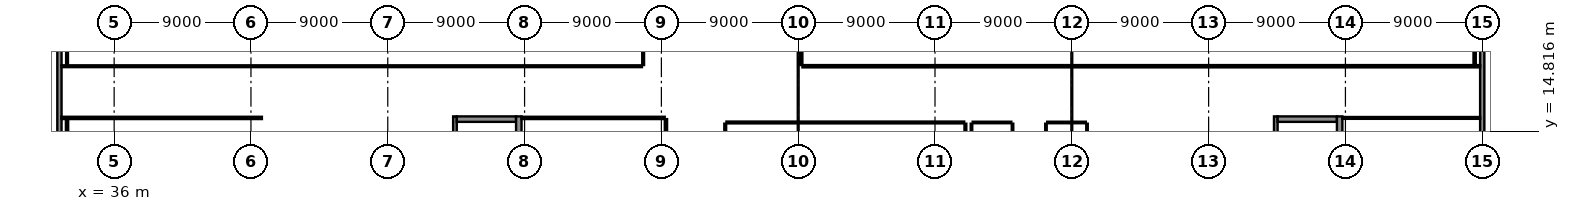
"""IFC4 building model, lengths in metres.
Left out: names, types, materials, properties, quantities, classifications, styles, units other than length and angle.
Written with IfcOpenShell. Run it as: python <this file> out.ifc"""

import sys

from ifc_helpers import new_model, si_unit, direction, frame, frame_2d, origin, place, context, subcontext, project, spatial, rectangle, extrude, element, fill, save


model = new_model("IFC4")
c1 = context("Model", 3, precision=1e-05, world=origin(), true_north=direction((0.0, 1.0)))
c2 = subcontext(c1, "Body", "Model", "MODEL_VIEW")
j1 = project(units=[si_unit("LENGTHUNIT", "METRE"), si_unit("PLANEANGLEUNIT", "RADIAN")], contexts=[c1])
p1 = place(None, origin())
s1 = spatial("IfcSite", under=j1, at=p1, CompositionType="ELEMENT")
p2 = place(p1, origin())
s2 = spatial("IfcBuilding", under=s1, at=p2, CompositionType="ELEMENT")
p3 = place(p2, frame((0.0, 0.0, 31.4)))
s3 = spatial("IfcBuildingStorey", under=s2, at=p3, CompositionType="ELEMENT", Elevation=31.4)
p4 = place(p3, frame((32.4, 23.96, 0.0), z_axis=(0.0, 0.0, 1.0), x_axis=(0.0, -1.0, 0.0)))
e1 = element("IfcWall", 1, at=p4, inside=s3, PredefinedType="SOLIDWALL", context=c2, shape_type="SweptSolid", body=[
    extrude(rectangle(XDim=11.97, YDim=0.28, at=frame_2d((5.985, 0.0))), origin(), (0.0, 0.0, 1.0), 3.095),
])
p5 = place(p4, frame((2.941, 0.0, 1.05)))
e2 = element("IfcOpeningElement", 2, at=p5, cuts=e1, PredefinedType="OPENING", context=c2, shape_type="SweptSolid", body=[
    extrude(rectangle(XDim=1.3, YDim=1.3, at=frame_2d((0.65, 0.65))), frame((0.0, 0.155, 0.0), z_axis=(0.0, -1.0, 0.0), x_axis=(1.0, 0.0, 0.0)), (0.0, 0.0, 1.0), 0.31),
])
p6 = place(p4, frame((8.5, 0.0, 1.05)))
e3 = element("IfcOpeningElement", 3, at=p6, cuts=e1, PredefinedType="OPENING", context=c2, shape_type="SweptSolid", body=[
    extrude(rectangle(XDim=1.3, YDim=1.3, at=frame_2d((0.65, 0.65))), frame((0.0, 0.155, 0.0), z_axis=(0.0, -1.0, 0.0), x_axis=(1.0, 0.0, 0.0)), (0.0, 0.0, 1.0), 0.31),
])
p7 = place(p3, frame((126.0, 12.128, 0.0), z_axis=(0.0, 0.0, 1.0), x_axis=(0.0, 1.0, 0.0)))
e4 = element("IfcWall", 4, at=p7, inside=s3, PredefinedType="SOLIDWALL", context=c2, shape_type="SweptSolid", body=[
    extrude(rectangle(XDim=11.624, YDim=0.28, at=frame_2d((5.812, 0.0))), origin(), (0.0, 0.0, 1.0), 3.245),
])
p8 = place(p7, frame((2.032, 0.0, 1.05)))
e5 = element("IfcOpeningElement", 5, at=p8, cuts=e4, PredefinedType="OPENING", context=c2, shape_type="SweptSolid", body=[
    extrude(rectangle(XDim=1.3, YDim=1.3, at=frame_2d((0.65, 0.65))), frame((0.0, 0.155, 0.0), z_axis=(0.0, -1.0, 0.0), x_axis=(1.0, 0.0, 0.0)), (0.0, 0.0, 1.0), 0.31),
])
p9 = place(p7, frame((7.487, 0.0, 1.05)))
e6 = element("IfcOpeningElement", 6, at=p9, cuts=e4, PredefinedType="OPENING", context=c2, shape_type="SweptSolid", body=[
    extrude(rectangle(XDim=1.3, YDim=1.3, at=frame_2d((0.65, 0.65))), frame((0.0, 0.155, 0.0), z_axis=(0.0, -1.0, 0.0), x_axis=(1.0, 0.0, 0.0)), (0.0, 0.0, 1.0), 0.31),
])
p10 = place(p3, frame((58.42, 13.04, 0.0), z_axis=(0.0, 0.0, 1.0), x_axis=(0.0, 1.0, 0.0)))
e7 = element("IfcWall", 7, at=p10, inside=s3, PredefinedType="SHEAR", context=c2, shape_type="SweptSolid", body=[
    extrude(rectangle(XDim=2.76, YDim=0.24, at=frame_2d((1.38, 0.0))), origin(), (0.0, 0.0, 1.0), 3.66),
])
p11 = place(p3, frame((58.54, 15.62, 0.0), z_axis=(0.0, 0.0, 1.0), x_axis=(1.0, 0.0, 0.0)))
e8 = element("IfcWall", 8, at=p11, inside=s3, PredefinedType="SHEAR", context=c2, shape_type="SweptSolid", body=[
    extrude(rectangle(XDim=3.9, YDim=0.36, at=frame_2d((1.95, 0.0))), origin(), (0.0, 0.0, 1.0), 3.66),
])
p12 = place(p11, frame((1.15, 0.0, 0.0)))
e9 = element("IfcOpeningElement", 9, at=p12, cuts=e8, PredefinedType="OPENING", context=c2, shape_type="SweptSolid", body=[
    extrude(rectangle(XDim=1.6, YDim=2.25, at=frame_2d((0.8, 1.125))), frame((0.0, 0.195, 0.0), z_axis=(0.0, -1.0, 0.0), x_axis=(1.0, 0.0, 0.0)), (0.0, 0.0, 1.0), 0.39),
])
p13 = place(p3, frame((62.62, 6.76, 0.0), z_axis=(0.0, 0.0, 1.0), x_axis=(0.0, 1.0, 0.0)))
e10 = element("IfcWall", 10, at=p13, inside=s3, PredefinedType="SHEAR", context=c2, shape_type="SweptSolid", body=[
    extrude(rectangle(XDim=9.04, YDim=0.36, at=frame_2d((4.52, 0.0))), origin(), (0.0, 0.0, 1.0), 3.66),
])
p14 = place(p3, frame((112.42, 13.04, 0.0), z_axis=(0.0, 0.0, 1.0), x_axis=(0.0, 1.0, 0.0)))
e11 = element("IfcWall", 11, at=p14, inside=s3, PredefinedType="SHEAR", context=c2, shape_type="SweptSolid", body=[
    extrude(rectangle(XDim=2.76, YDim=0.24, at=frame_2d((1.38, 0.0))), origin(), (0.0, 0.0, 1.0), 3.66),
])
p15 = place(p3, frame((112.54, 15.62, 0.0), z_axis=(0.0, 0.0, 1.0), x_axis=(1.0, 0.0, 0.0)))
e12 = element("IfcWall", 12, at=p15, inside=s3, PredefinedType="SHEAR", context=c2, shape_type="SweptSolid", body=[
    extrude(rectangle(XDim=3.9, YDim=0.36, at=frame_2d((1.95, 0.0))), origin(), (0.0, 0.0, 1.0), 3.66),
])
p16 = place(p15, frame((1.15, 0.0, 0.0)))
e13 = element("IfcOpeningElement", 13, at=p16, cuts=e12, PredefinedType="OPENING", context=c2, shape_type="SweptSolid", body=[
    extrude(rectangle(XDim=1.6, YDim=2.25, at=frame_2d((0.8, 1.125))), frame((0.0, 0.195, 0.0), z_axis=(0.0, -1.0, 0.0), x_axis=(1.0, 0.0, 0.0)), (0.0, 0.0, 1.0), 0.39),
])
p17 = place(p3, frame((116.62, 6.76, 0.0), z_axis=(0.0, 0.0, 1.0), x_axis=(0.0, 1.0, 0.0)))
e14 = element("IfcWall", 14, at=p17, inside=s3, PredefinedType="SHEAR", context=c2, shape_type="SweptSolid", body=[
    extrude(rectangle(XDim=9.04, YDim=0.36, at=frame_2d((4.52, 0.0))), origin(), (0.0, 0.0, 1.0), 3.66),
])
p18 = place(p3, frame((32.9, 0.47, 0.0), z_axis=(0.0, 0.0, 1.0), x_axis=(0.0, 1.0, 0.0)))
e15 = element("IfcWall", 15, at=p18, inside=s3, PredefinedType="PARTITIONING", context=c2, shape_type="SweptSolid", body=[
    extrude(rectangle(XDim=15.15, YDim=0.15, at=frame_2d((7.575, 0.0))), origin(), (0.0, 0.0, 1.0), 3.64),
])
p19 = place(p3, frame((32.535, 15.7, 0.0), z_axis=(0.0, 0.0, 1.0), x_axis=(1.0, 0.0, 0.0)))
e16 = element("IfcWall", 16, at=p19, inside=s3, PredefinedType="PARTITIONING", context=c2, shape_type="SweptSolid", body=[
    extrude(rectangle(XDim=13.185, YDim=0.15, at=frame_2d((6.593, 0.0))), origin(), (0.0, 0.0, 1.0), 3.64),
])
p20 = place(p19, frame((6.068, 0.0, 0.0)))
e17 = element("IfcOpeningElement", 17, at=p20, cuts=e16, PredefinedType="OPENING", context=c2, shape_type="SweptSolid", body=[
    extrude(rectangle(XDim=1.05, YDim=2.25, at=frame_2d((0.525, 1.125))), frame((0.0, 0.09, 0.0), z_axis=(0.0, -1.0, 0.0), x_axis=(1.0, 0.0, 0.0)), (0.0, 0.0, 1.0), 0.18),
])
p21 = place(p3, frame((62.795, 15.7, 0.0), z_axis=(0.0, 0.0, 1.0), x_axis=(1.0, 0.0, 0.0)))
e18 = element("IfcWall", 18, at=p21, inside=s3, PredefinedType="PARTITIONING", context=c2, shape_type="SweptSolid", body=[
    extrude(rectangle(XDim=9.425, YDim=0.15, at=frame_2d((4.712, 0.0))), origin(), (0.0, 0.0, 1.0), 3.64),
])
p22 = place(p21, frame((4.187, 0.0, 0.0)))
e19 = element("IfcOpeningElement", 19, at=p22, cuts=e18, PredefinedType="OPENING", context=c2, shape_type="SweptSolid", body=[
    extrude(rectangle(XDim=1.05, YDim=2.25, at=frame_2d((0.525, 1.125))), frame((0.0, 0.09, 0.0), z_axis=(0.0, -1.0, 0.0), x_axis=(1.0, 0.0, 0.0)), (0.0, 0.0, 1.0), 0.18),
])
p23 = place(p3, frame((72.3, 15.62, 0.0), z_axis=(0.0, 0.0, 1.0), x_axis=(0.0, -1.0, 0.0)))
e20 = element("IfcWall", 20, at=p23, inside=s3, PredefinedType="PARTITIONING", context=c2, shape_type="SweptSolid", body=[
    extrude(rectangle(XDim=3.04, YDim=0.15, at=frame_2d((1.52, 0.0))), origin(), (0.0, 0.0, 1.0), 3.64),
])
p24 = place(p3, frame((70.8, 23.865, 0.0), z_axis=(0.0, 0.0, 1.0), x_axis=(0.0, -1.0, 0.0)))
e21 = element("IfcWall", 21, at=p24, inside=s3, PredefinedType="PARTITIONING", context=c2, shape_type="SweptSolid", body=[
    extrude(rectangle(XDim=4.685, YDim=0.12, at=frame_2d((2.343, 0.0))), origin(), (0.0, 0.0, 1.0), 3.64),
])
p25 = place(p3, frame((70.72, 19.1, 0.0), z_axis=(0.0, 0.0, 1.0), x_axis=(-1.0, 0.0, 0.0)))
e22 = element("IfcWall", 22, at=p25, inside=s3, PredefinedType="PARTITIONING", context=c2, shape_type="SweptSolid", body=[
    extrude(rectangle(XDim=38.185, YDim=0.12, at=frame_2d((19.093, 0.0))), origin(), (0.0, 0.0, 1.0), 3.64),
])
p26 = place(p25, frame((18.617, 0.0, 0.0)))
e23 = element("IfcOpeningElement", 23, at=p26, cuts=e22, PredefinedType="OPENING", context=c2, shape_type="SweptSolid", body=[
    extrude(rectangle(XDim=0.95, YDim=2.15, at=frame_2d((0.475, 1.075))), frame((0.0, 0.075, 0.0), z_axis=(0.0, -1.0, 0.0), x_axis=(1.0, 0.0, 0.0)), (0.0, 0.0, 1.0), 0.15),
])
p27 = place(p3, frame((32.9, 19.155, 0.0), z_axis=(0.0, 0.0, 1.0), x_axis=(0.0, 1.0, 0.0)))
e24 = element("IfcWall", 24, at=p27, inside=s3, PredefinedType="PARTITIONING", context=c2, shape_type="SweptSolid", body=[
    extrude(rectangle(XDim=4.71, YDim=0.12, at=frame_2d((2.355, 0.0))), origin(), (0.0, 0.0, 1.0), 3.64),
])
p28 = place(p3, frame((125.865, 19.1, 0.0), z_axis=(0.0, 0.0, 1.0), x_axis=(-1.0, 0.0, 0.0)))
e25 = element("IfcWall", 25, at=p28, inside=s3, PredefinedType="PARTITIONING", context=c2, shape_type="SweptSolid", body=[
    extrude(rectangle(XDim=44.585, YDim=0.15, at=frame_2d((22.292, 0.0))), origin(), (0.0, 0.0, 1.0), 3.64),
])
p29 = place(p28, frame((21.768, 0.0, 0.0)))
e26 = element("IfcOpeningElement", 26, at=p29, cuts=e25, PredefinedType="OPENING", context=c2, shape_type="SweptSolid", body=[
    extrude(rectangle(XDim=1.05, YDim=2.25, at=frame_2d((0.525, 1.125))), frame((0.0, 0.09, 0.0), z_axis=(0.0, -1.0, 0.0), x_axis=(1.0, 0.0, 0.0)), (0.0, 0.0, 1.0), 0.18),
])
p30 = place(p3, frame((81.2, 19.18, 0.0), z_axis=(0.0, 0.0, 1.0), x_axis=(0.0, 1.0, 0.0)))
e27 = element("IfcWall", 27, at=p30, inside=s3, PredefinedType="PARTITIONING", context=c2, shape_type="SweptSolid", body=[
    extrude(rectangle(XDim=4.572, YDim=0.15, at=frame_2d((2.286, 0.0))), origin(), (0.0, 0.0, 1.0), 3.315),
])
p31 = place(p3, frame((125.5, 23.53, 0.0), z_axis=(0.0, 0.0, 1.0), x_axis=(0.0, -1.0, 0.0)))
e28 = element("IfcWall", 28, at=p31, inside=s3, PredefinedType="PARTITIONING", context=c2, shape_type="SweptSolid", body=[
    extrude(rectangle(XDim=4.36, YDim=0.15, at=frame_2d((2.18, 0.0))), origin(), (0.0, 0.0, 1.0), 3.64),
])
p32 = place(p3, frame((76.2, 3.67, 0.0), z_axis=(0.0, 0.0, 1.0), x_axis=(0.0, 1.0, 0.0)))
e29 = element("IfcWall", 29, at=p32, inside=s3, PredefinedType="PARTITIONING", context=c2, shape_type="SweptSolid", body=[
    extrude(rectangle(XDim=11.65, YDim=0.12, at=frame_2d((5.825, 0.0))), origin(), (0.0, 0.0, 1.0), 3.64),
])
p33 = place(p3, frame((76.28, 15.4, 0.0), z_axis=(0.0, 0.0, 1.0), x_axis=(1.0, 0.0, 0.0)))
e30 = element("IfcWall", 30, at=p33, inside=s3, PredefinedType="PARTITIONING", context=c2, shape_type="SweptSolid", body=[
    extrude(rectangle(XDim=15.64, YDim=0.12, at=frame_2d((7.82, 0.0))), origin(), (0.0, 0.0, 1.0), 3.64),
])
p34 = place(p33, frame((7.37, 0.0, 0.0)))
e31 = element("IfcOpeningElement", 31, at=p34, cuts=e30, PredefinedType="OPENING", context=c2, shape_type="SweptSolid", body=[
    extrude(rectangle(XDim=0.9, YDim=2.1, at=frame_2d((0.45, 1.05))), frame((0.0, 0.075, 0.0), z_axis=(0.0, -1.0, 0.0), x_axis=(1.0, 0.0, 0.0)), (0.0, 0.0, 1.0), 0.15),
])
p35 = place(p3, frame((92.0, 15.32, 0.0), z_axis=(0.0, 0.0, 1.0), x_axis=(0.0, -1.0, 0.0)))
e32 = element("IfcWall", 32, at=p35, inside=s3, PredefinedType="PARTITIONING", context=c2, shape_type="SweptSolid", body=[
    extrude(rectangle(XDim=11.65, YDim=0.12, at=frame_2d((5.825, 0.0))), origin(), (0.0, 0.0, 1.0), 3.64),
])
p36 = place(p3, frame((116.795, 15.7, 0.0), z_axis=(0.0, 0.0, 1.0), x_axis=(1.0, 0.0, 0.0)))
e33 = element("IfcWall", 33, at=p36, inside=s3, PredefinedType="PARTITIONING", context=c2, shape_type="SweptSolid", body=[
    extrude(rectangle(XDim=9.07, YDim=0.12, at=frame_2d((4.535, 0.0))), origin(), (0.0, 0.0, 1.0), 3.64),
])
p37 = place(p36, frame((4.06, 0.0, 0.0)))
e34 = element("IfcOpeningElement", 34, at=p37, cuts=e33, PredefinedType="OPENING", context=c2, shape_type="SweptSolid", body=[
    extrude(rectangle(XDim=0.95, YDim=2.15, at=frame_2d((0.475, 1.075))), frame((0.0, 0.075, 0.0), z_axis=(0.0, -1.0, 0.0), x_axis=(1.0, 0.0, 0.0)), (0.0, 0.0, 1.0), 0.15),
])
p38 = place(p3, frame((92.48, 15.4, 0.0), z_axis=(0.0, 0.0, 1.0), x_axis=(1.0, 0.0, 0.0)))
e35 = element("IfcWall", 35, at=p38, inside=s3, PredefinedType="PARTITIONING", context=c2, shape_type="SweptSolid", body=[
    extrude(rectangle(XDim=2.54, YDim=0.1, at=frame_2d((1.27, 0.0))), origin(), (0.0, 0.0, 1.0), 3.64),
])
p39 = place(p3, frame((95.1, 15.32, 0.0), z_axis=(0.0, 0.0, 1.0), x_axis=(0.0, -1.0, 0.0)))
e36 = element("IfcWall", 36, at=p39, inside=s3, PredefinedType="PARTITIONING", context=c2, shape_type="SweptSolid", body=[
    extrude(rectangle(XDim=5.34, YDim=0.1, at=frame_2d((2.67, 0.0))), origin(), (0.0, 0.0, 1.0), 3.64),
])
p40 = place(p39, frame((2.22, 0.0, 0.0)))
e37 = element("IfcOpeningElement", 37, at=p40, cuts=e36, PredefinedType="OPENING", context=c2, shape_type="SweptSolid", body=[
    extrude(rectangle(XDim=0.9, YDim=2.05, at=frame_2d((0.45, 1.025))), frame((0.0, 0.065, 0.0), z_axis=(0.0, -1.0, 0.0), x_axis=(1.0, 0.0, 0.0)), (0.0, 0.0, 1.0), 0.13),
])
p41 = place(p3, frame((92.4, 9.845, 0.0), z_axis=(0.0, 0.0, 1.0), x_axis=(0.0, 1.0, 0.0)))
e38 = element("IfcWall", 38, at=p41, inside=s3, PredefinedType="PARTITIONING", context=c2, shape_type="SweptSolid", body=[
    extrude(rectangle(XDim=5.475, YDim=0.1, at=frame_2d((2.738, 0.0))), origin(), (0.0, 0.0, 1.0), 3.64),
])
p42 = place(p3, frame((97.38, 15.4, 0.0), z_axis=(0.0, 0.0, 1.0), x_axis=(1.0, 0.0, 0.0)))
e39 = element("IfcWall", 39, at=p42, inside=s3, PredefinedType="PARTITIONING", context=c2, shape_type="SweptSolid", body=[
    extrude(rectangle(XDim=2.54, YDim=0.1, at=frame_2d((1.27, 0.0))), origin(), (0.0, 0.0, 1.0), 3.64),
])
p43 = place(p3, frame((100.0, 15.32, 0.0), z_axis=(0.0, 0.0, 1.0), x_axis=(0.0, -1.0, 0.0)))
e40 = element("IfcWall", 40, at=p43, inside=s3, PredefinedType="PARTITIONING", context=c2, shape_type="SweptSolid", body=[
    extrude(rectangle(XDim=5.44, YDim=0.1, at=frame_2d((2.72, 0.0))), origin(), (0.0, 0.0, 1.0), 3.64),
])
p44 = place(p3, frame((97.3, 9.88, 0.0), z_axis=(0.0, 0.0, 1.0), x_axis=(0.0, 1.0, 0.0)))
e41 = element("IfcWall", 41, at=p44, inside=s3, PredefinedType="PARTITIONING", context=c2, shape_type="SweptSolid", body=[
    extrude(rectangle(XDim=5.44, YDim=0.1, at=frame_2d((2.72, 0.0))), origin(), (0.0, 0.0, 1.0), 3.64),
])
p45 = place(p44, frame((2.22, 0.0, 0.0)))
e42 = element("IfcOpeningElement", 42, at=p45, cuts=e41, PredefinedType="OPENING", context=c2, shape_type="SweptSolid", body=[
    extrude(rectangle(XDim=1.0, YDim=2.1, at=frame_2d((0.5, 1.05))), frame((0.0, 0.065, 0.0), z_axis=(0.0, -1.0, 0.0), x_axis=(1.0, 0.0, 0.0)), (0.0, 0.0, 1.0), 0.13),
])
p46 = place(p5, origin())
e43 = element("IfcWindow", 43, at=p46, inside=s3, PartitioningType="SINGLE_PANEL", PredefinedType="WINDOW", context=c2, shape_type="SweptSolid", body=[
    extrude(rectangle(XDim=1.3, YDim=1.3, at=frame_2d((0.65, 0.65))), frame((0.0, 0.03, 0.0), z_axis=(0.0, -1.0, 0.0), x_axis=(1.0, 0.0, 0.0)), (0.0, 0.0, 1.0), 0.06),
])
fill(e2, e43)
p47 = place(p6, origin())
e44 = element("IfcWindow", 44, at=p47, inside=s3, PartitioningType="SINGLE_PANEL", PredefinedType="WINDOW", context=c2, shape_type="SweptSolid", body=[
    extrude(rectangle(XDim=1.3, YDim=1.3, at=frame_2d((0.65, 0.65))), frame((0.0, 0.03, 0.0), z_axis=(0.0, -1.0, 0.0), x_axis=(1.0, 0.0, 0.0)), (0.0, 0.0, 1.0), 0.06),
])
fill(e3, e44)
p48 = place(p8, origin())
e45 = element("IfcWindow", 45, at=p48, inside=s3, PartitioningType="SINGLE_PANEL", PredefinedType="WINDOW", context=c2, shape_type="SweptSolid", body=[
    extrude(rectangle(XDim=1.3, YDim=1.3, at=frame_2d((0.65, 0.65))), frame((0.0, 0.03, 0.0), z_axis=(0.0, -1.0, 0.0), x_axis=(1.0, 0.0, 0.0)), (0.0, 0.0, 1.0), 0.06),
])
fill(e5, e45)
p49 = place(p9, origin())
e46 = element("IfcWindow", 46, at=p49, inside=s3, PartitioningType="SINGLE_PANEL", PredefinedType="WINDOW", context=c2, shape_type="SweptSolid", body=[
    extrude(rectangle(XDim=1.3, YDim=1.3, at=frame_2d((0.65, 0.65))), frame((0.0, 0.03, 0.0), z_axis=(0.0, -1.0, 0.0), x_axis=(1.0, 0.0, 0.0)), (0.0, 0.0, 1.0), 0.06),
])
fill(e6, e46)
p50 = place(p12, origin())
e47 = element("IfcDoor", 47, at=p50, inside=s3, OperationType="DOUBLE_DOOR_SINGLE_SWING", PredefinedType="DOOR", context=c2, shape_type="SweptSolid", body=[
    extrude(rectangle(XDim=1.6, YDim=2.25, at=frame_2d((0.8, 1.125))), frame((0.0, 0.025, 0.0), z_axis=(0.0, -1.0, 0.0), x_axis=(1.0, 0.0, 0.0)), (0.0, 0.0, 1.0), 0.05),
])
fill(e9, e47)
p51 = place(p16, origin())
e48 = element("IfcDoor", 48, at=p51, inside=s3, OperationType="DOUBLE_DOOR_SINGLE_SWING", PredefinedType="DOOR", context=c2, shape_type="SweptSolid", body=[
    extrude(rectangle(XDim=1.6, YDim=2.25, at=frame_2d((0.8, 1.125))), frame((0.0, 0.025, 0.0), z_axis=(0.0, -1.0, 0.0), x_axis=(1.0, 0.0, 0.0)), (0.0, 0.0, 1.0), 0.05),
])
fill(e13, e48)
p52 = place(p20, origin())
e49 = element("IfcDoor", 49, at=p52, inside=s3, OperationType="SINGLE_SWING_LEFT", PredefinedType="DOOR", context=c2, shape_type="SweptSolid", body=[
    extrude(rectangle(XDim=1.05, YDim=2.25, at=frame_2d((0.525, 1.125))), frame((0.0, 0.025, 0.0), z_axis=(0.0, -1.0, 0.0), x_axis=(1.0, 0.0, 0.0)), (0.0, 0.0, 1.0), 0.05),
])
fill(e17, e49)
p53 = place(p22, origin())
e50 = element("IfcDoor", 50, at=p53, inside=s3, OperationType="SINGLE_SWING_LEFT", PredefinedType="DOOR", context=c2, shape_type="SweptSolid", body=[
    extrude(rectangle(XDim=1.05, YDim=2.25, at=frame_2d((0.525, 1.125))), frame((0.0, 0.025, 0.0), z_axis=(0.0, -1.0, 0.0), x_axis=(1.0, 0.0, 0.0)), (0.0, 0.0, 1.0), 0.05),
])
fill(e19, e50)
p54 = place(p26, frame((0.95, 0.0, 0.0), z_axis=(0.0, 0.0, 1.0), x_axis=(-1.0, 0.0, 0.0)))
e51 = element("IfcDoor", 51, at=p54, inside=s3, OperationType="SINGLE_SWING_RIGHT", PredefinedType="DOOR", context=c2, shape_type="SweptSolid", body=[
    extrude(rectangle(XDim=0.95, YDim=2.15, at=frame_2d((0.475, 1.075))), frame((0.0, 0.025, 0.0), z_axis=(0.0, -1.0, 0.0), x_axis=(1.0, 0.0, 0.0)), (0.0, 0.0, 1.0), 0.05),
])
fill(e23, e51)
p55 = place(p29, origin())
e52 = element("IfcDoor", 52, at=p55, inside=s3, OperationType="SINGLE_SWING_LEFT", PredefinedType="DOOR", context=c2, shape_type="SweptSolid", body=[
    extrude(rectangle(XDim=1.05, YDim=2.25, at=frame_2d((0.525, 1.125))), frame((0.0, 0.025, 0.0), z_axis=(0.0, -1.0, 0.0), x_axis=(1.0, 0.0, 0.0)), (0.0, 0.0, 1.0), 0.05),
])
fill(e26, e52)
p56 = place(p34, frame((0.9, 0.0, 0.0), z_axis=(0.0, 0.0, 1.0), x_axis=(-1.0, 0.0, 0.0)))
e53 = element("IfcDoor", 53, at=p56, inside=s3, OperationType="SINGLE_SWING_RIGHT", PredefinedType="DOOR", context=c2, shape_type="SweptSolid", body=[
    extrude(rectangle(XDim=0.9, YDim=2.1, at=frame_2d((0.45, 1.05))), frame((0.0, 0.025, 0.0), z_axis=(0.0, -1.0, 0.0), x_axis=(1.0, 0.0, 0.0)), (0.0, 0.0, 1.0), 0.05),
])
fill(e31, e53)
p57 = place(p37, frame((0.95, 0.0, 0.0), z_axis=(0.0, 0.0, 1.0), x_axis=(-1.0, 0.0, 0.0)))
e54 = element("IfcDoor", 54, at=p57, inside=s3, OperationType="SINGLE_SWING_RIGHT", PredefinedType="DOOR", context=c2, shape_type="SweptSolid", body=[
    extrude(rectangle(XDim=0.95, YDim=2.15, at=frame_2d((0.475, 1.075))), frame((0.0, 0.025, 0.0), z_axis=(0.0, -1.0, 0.0), x_axis=(1.0, 0.0, 0.0)), (0.0, 0.0, 1.0), 0.05),
])
fill(e34, e54)
save(model, sys.argv[1])
